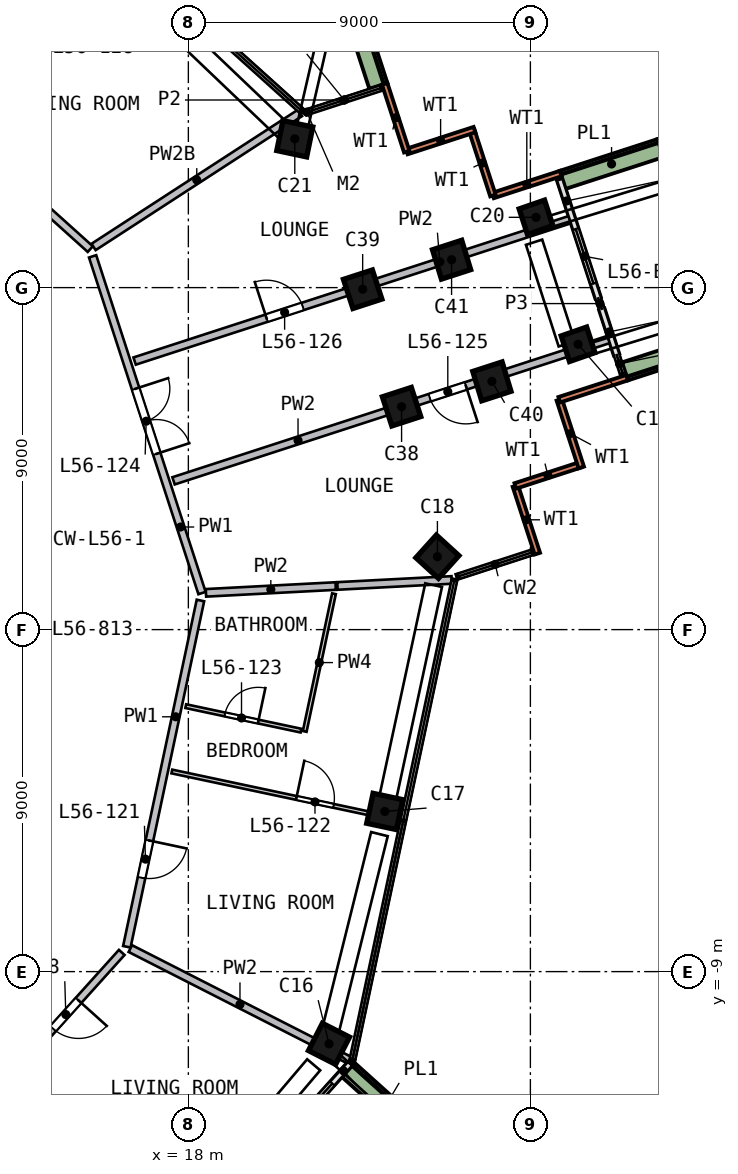
"""IFC4 building model, lengths in metres.
Left out: names, types, materials, properties, quantities, classifications, styles, units other than length and angle.
Written with IfcOpenShell. Run it as: python <this file> out.ifc"""

import sys

from ifc_helpers import new_model, si_unit, direction, frame, frame_2d, origin, origin_2d, place, context, subcontext, project, spatial, rectangle, extrude, element, fill, save


model = new_model("IFC4")
c1 = context("Model", 3, precision=1e-05, world=origin(), true_north=direction((0.0, 1.0)))
c2 = subcontext(c1, "Body", "Model", "MODEL_VIEW")
j1 = project(units=[si_unit("LENGTHUNIT", "METRE"), si_unit("PLANEANGLEUNIT", "RADIAN")], contexts=[c1])
p1 = place(None, origin())
s1 = spatial("IfcSite", under=j1, at=p1, CompositionType="ELEMENT")
p2 = place(p1, origin())
s2 = spatial("IfcBuilding", under=s1, at=p2, CompositionType="ELEMENT")
p3 = place(p2, frame((0.0, 0.0, 230.5)))
s3 = spatial("IfcBuildingStorey", under=s2, at=p3, CompositionType="ELEMENT", Elevation=230.5)
p4 = place(p3, frame((21.639, -11.025, 0.0), z_axis=(0.051543375, 0.103314818, 0.993312302), x_axis=(-0.450968307, -0.885041164, 0.11545442)))
e1 = element("IfcColumn", 1, at=p4, inside=s3, PredefinedType="COLUMN", context=c2, shape_type="SweptSolid", body=[
    extrude(rectangle(XDim=0.8, YDim=0.8, at=origin_2d()), origin(), (0.0, 0.0, 1.0), 3.211),
])
p5 = place(p3, frame((23.141, -4.919, 0.0), z_axis=(0.022434279, 0.110270183, 0.993648424), x_axis=(0.206353156, 0.971985836, -0.112525153)))
e2 = element("IfcColumn", 2, at=p5, inside=s3, PredefinedType="COLUMN", context=c2, shape_type="SweptSolid", body=[
    extrude(rectangle(XDim=0.8, YDim=0.8, at=origin_2d()), origin(), (0.0, 0.0, 1.0), 3.21),
])
p6 = place(p3, frame((24.565, 1.778, 0.0), z_axis=(-0.009425041, 0.116672885, 0.993125675), x_axis=(-0.672082244, -0.736131103, 0.080102789)))
e3 = element("IfcColumn", 3, at=p6, inside=s3, PredefinedType="COLUMN", context=c2, shape_type="SweptSolid", body=[
    extrude(rectangle(XDim=0.8, YDim=0.8, at=origin_2d()), origin(), (0.0, 0.0, 1.0), 3.212),
])
p7 = place(p3, frame((28.13, 7.29, 0.0), z_axis=(0.102010703, 0.178631077, 0.97861369), x_axis=(-0.326142329, 0.935378422, -0.136742054)))
e4 = element("IfcColumn", 4, at=p7, inside=s3, PredefinedType="COLUMN", context=c2, shape_type="SweptSolid", body=[
    extrude(rectangle(XDim=0.7, YDim=0.7, at=origin_2d()), origin(), (0.0, 0.0, 1.0), 3.26),
])
p8 = place(p3, frame((27.042, 10.637, 0.0), z_axis=(0.086490317, 0.173806496, 0.980974376), x_axis=(-0.324347801, 0.935930959, -0.1372288)))
e5 = element("IfcColumn", 5, at=p8, inside=s3, PredefinedType="COLUMN", context=c2, shape_type="SweptSolid", body=[
    extrude(rectangle(XDim=0.7, YDim=0.7, at=origin_2d()), origin(), (0.0, 0.0, 1.0), 3.252),
])
p9 = place(p3, frame((20.875, 12.797, 0.0), z_axis=(-0.061723248, 0.098741994, 0.993196989), x_axis=(0.976425462, -0.200246615, 0.08058915)))
e6 = element("IfcColumn", 6, at=p9, inside=s3, PredefinedType="COLUMN", context=c2, shape_type="SweptSolid", body=[
    extrude(rectangle(XDim=0.8, YDim=0.8, at=origin_2d()), origin(), (0.0, 0.0, 1.0), 3.212),
])
for number, where, z_axis, x_axis in (
    (7, (23.645, 5.731, 0.0), (-0.028, 0.112, 0.993), (0.951, 0.308, -0.008)),
    (8, (22.638, 8.828, 0.0), (-0.043, 0.107, 0.993), (0.951, 0.31, 0.008)),
):
    element("IfcColumn", number, at=place(p3, frame(where, z_axis=z_axis, x_axis=x_axis)), inside=s3, PredefinedType="COLUMN", context=c2, shape_type="SweptSolid", body=[
        extrude(rectangle(XDim=0.8, YDim=0.8, at=origin_2d()), origin(), (0.0, 0.0, 1.0), 3.211),
    ])
p10 = place(p3, frame((25.856, 6.326, 0.0), z_axis=(0.106725433, 0.168225683, 0.979953979), x_axis=(0.945902743, 0.286533668, -0.152205313)))
e9 = element("IfcColumn", 9, at=p10, inside=s3, PredefinedType="COLUMN", context=c2, shape_type="SweptSolid", body=[
    extrude(rectangle(XDim=0.8, YDim=0.8, at=origin_2d()), origin(), (0.0, 0.0, 1.0), 3.255),
])
p11 = place(p3, frame((24.814, 9.535, 0.0), z_axis=(0.09193902, 0.163580792, 0.9822365), x_axis=(0.947471522, 0.289093697, -0.136830366)))
e10 = element("IfcColumn", 10, at=p11, inside=s3, PredefinedType="COLUMN", context=c2, shape_type="SweptSolid", body=[
    extrude(rectangle(XDim=0.8, YDim=0.8, at=origin_2d()), origin(), (0.0, 0.0, 1.0), 3.248),
])
p12 = place(p3, frame((27.184, 1.998, 0.0), z_axis=(0.0, 0.0, 1.0), x_axis=(-0.308991853, 0.951064685, 0.0)))
e11 = element("IfcWall", 11, at=p12, inside=s3, PredefinedType="SOLIDWALL", context=c2, shape_type="SweptSolid", body=[
    extrude(rectangle(XDim=1.875, YDim=0.15, at=frame_2d((0.938, 0.0))), origin(), (0.0, 0.0, 1.0), 3.19),
])
p13 = place(p3, frame((26.604, 3.781, 0.0), z_axis=(0.0, 0.0, 1.0), x_axis=(0.951030082, 0.309098339, 0.0)))
e12 = element("IfcWall", 12, at=p13, inside=s3, PredefinedType="SOLIDWALL", context=c2, shape_type="SweptSolid", body=[
    extrude(rectangle(XDim=1.8, YDim=0.15, at=frame_2d((0.9, 0.0))), origin(), (0.0, 0.0, 1.0), 3.19),
])
p14 = place(p3, frame((28.34, 4.266, 0.0), z_axis=(0.0, 0.0, 1.0), x_axis=(-0.308953592, 0.951077114, 0.0)))
e13 = element("IfcWall", 13, at=p14, inside=s3, PredefinedType="SOLIDWALL", context=c2, shape_type="SweptSolid", body=[
    extrude(rectangle(XDim=1.875, YDim=0.15, at=frame_2d((0.938, 0.0))), origin(), (0.0, 0.0, 1.0), 3.19),
])
for number, where, z_axis, x_axis in (
    (14, (27.76, 6.05, 0.0), (0.0, 0.0, 1.0), (0.951, 0.309, 0.0)),
    (15, (27.797, 12.002, 0.0), (0.0, 0.0, 1.0), (-0.951, -0.309, 0.0)),
):
    element("IfcWall", number, at=place(p3, frame(where, z_axis=z_axis, x_axis=x_axis)), inside=s3, PredefinedType="SOLIDWALL", context=c2, shape_type="SweptSolid", body=[
        extrude(rectangle(XDim=1.875, YDim=0.15, at=frame_2d((0.938, 0.0))), origin(), (0.0, 0.0, 1.0), 3.19),
    ])
p15 = place(p3, frame((26.014, 11.423, 0.0), z_axis=(0.0, 0.0, 1.0), x_axis=(-0.308975661, 0.951069945, 0.0)))
e16 = element("IfcWall", 16, at=p15, inside=s3, PredefinedType="SOLIDWALL", context=c2, shape_type="SweptSolid", body=[
    extrude(rectangle(XDim=1.8, YDim=0.15, at=frame_2d((0.9, 0.0))), origin(), (0.0, 0.0, 1.0), 3.19),
])
for number, where, z_axis, x_axis in (
    (17, (25.529, 13.158, 0.0), (0.0, 0.0, 1.0), (-0.951, -0.309, 0.0)),
    (18, (23.746, 12.579, 0.0), (0.0, 0.0, 1.0), (-0.309, 0.951, 0.0)),
):
    element("IfcWall", number, at=place(p3, frame(where, z_axis=z_axis, x_axis=x_axis)), inside=s3, PredefinedType="SOLIDWALL", context=c2, shape_type="SweptSolid", body=[
        extrude(rectangle(XDim=1.875, YDim=0.15, at=frame_2d((0.938, 0.0))), origin(), (0.0, 0.0, 1.0), 3.19),
    ])
p16 = place(p3, frame((19.909, -14.03, 0.0), z_axis=(0.0, 0.0, 1.0), x_axis=(0.669103303, 0.743169409, 0.0)))
e19 = element("IfcWall", 19, at=p16, inside=s3, PredefinedType="SOLIDWALL", context=c2, shape_type="SweptSolid", body=[
    extrude(rectangle(XDim=3.504, YDim=0.15, at=frame_2d((1.752, 0.0))), origin(), (0.0, 0.0, 1.0), 2.525),
])
p17 = place(p16, frame((0.4, 0.0, 0.0)))
e20 = element("IfcOpeningElement", 20, at=p17, cuts=e19, PredefinedType="OPENING", context=c2, shape_type="SweptSolid", body=[
    extrude(rectangle(XDim=2.4, YDim=2.4, at=frame_2d((1.2, 1.2))), frame((0.0, 0.085, 0.0), z_axis=(0.0, -1.0, 0.0), x_axis=(1.0, 0.0, 0.0)), (0.0, 0.0, 1.0), 0.17),
])
p18 = place(p3, frame((28.781, 8.731, 0.0), z_axis=(0.0, 0.0, 1.0), x_axis=(-0.308984471, 0.951067083, 0.0)))
e21 = element("IfcWall", 21, at=p18, inside=s3, PredefinedType="SOLIDWALL", context=c2, shape_type="SweptSolid", body=[
    extrude(rectangle(XDim=3.26, YDim=0.15, at=frame_2d((1.63, 0.0))), origin(), (0.0, 0.0, 1.0), 2.525),
])
p19 = place(p18, frame((0.4, 0.0, 0.0)))
e22 = element("IfcOpeningElement", 22, at=p19, cuts=e21, PredefinedType="OPENING", context=c2, shape_type="SweptSolid", body=[
    extrude(rectangle(XDim=1.5, YDim=2.4, at=frame_2d((0.75, 1.2))), frame((0.0, 0.085, 0.0), z_axis=(0.0, -1.0, 0.0), x_axis=(1.0, 0.0, 0.0)), (0.0, 0.0, 1.0), 0.17),
])
p20 = place(p3, frame((29.267, 7.238, 0.0), z_axis=(0.0, 0.0, 1.0), x_axis=(-0.309077248, 0.951036937, 0.0)))
e23 = element("IfcWall", 23, at=p20, inside=s3, PredefinedType="SOLIDWALL", context=c2, shape_type="SweptSolid", body=[
    extrude(rectangle(XDim=1.251, YDim=0.15, at=frame_2d((0.625, 0.0))), origin(), (0.0, 0.0, 1.0), 2.525),
])
p21 = place(p3, frame((24.216, -13.394, 0.0), z_axis=(0.0, 0.0, 1.0), x_axis=(-0.743132215, 0.669144611, 0.0)))
e24 = element("IfcWall", 24, at=p21, inside=s3, PredefinedType="SOLIDWALL", context=c2, shape_type="SweptSolid", body=[
    extrude(rectangle(XDim=2.699, YDim=0.5, at=frame_2d((1.35, 0.0))), origin(), (0.0, 0.0, 1.0), 0.7),
])
p22 = place(p3, frame((29.49, 6.796, 0.0), z_axis=(0.0, 0.0, 1.0), x_axis=(0.951059864, 0.309006691, 0.0)))
e25 = element("IfcWall", 25, at=p22, inside=s3, PredefinedType="SOLIDWALL", context=c2, shape_type="SweptSolid", body=[
    extrude(rectangle(XDim=3.199, YDim=0.5, at=frame_2d((1.6, 0.0))), origin(), (0.0, 0.0, 1.0), 0.7),
])
p23 = place(p3, frame((32.218, 7.945, 0.0), z_axis=(0.0, 0.0, 1.0), x_axis=(-0.309032953, 0.951051331, 0.0)))
e26 = element("IfcWall", 26, at=p23, inside=s3, PredefinedType="SOLIDWALL", context=c2, shape_type="SweptSolid", body=[
    extrude(rectangle(XDim=5.3, YDim=0.5, at=frame_2d((2.65, 0.0))), origin(), (0.0, 0.0, 1.0), 0.7),
])
p24 = place(p3, frame((30.419, 12.67, 0.0), z_axis=(0.0, 0.0, 1.0), x_axis=(-0.951061984, -0.309000165, 0.0)))
e27 = element("IfcWall", 27, at=p24, inside=s3, PredefinedType="SOLIDWALL", context=c2, shape_type="SweptSolid", body=[
    extrude(rectangle(XDim=2.699, YDim=0.5, at=frame_2d((1.35, 0.0))), origin(), (0.0, 0.0, 1.0), 0.7),
])
p25 = place(p3, frame((23.0, 14.309, 0.0), z_axis=(0.0, 0.0, 1.0), x_axis=(-0.309030937, 0.951051986, 0.0)))
e28 = element("IfcWall", 28, at=p25, inside=s3, PredefinedType="SOLIDWALL", context=c2, shape_type="SweptSolid", body=[
    extrude(rectangle(XDim=2.303, YDim=0.5, at=frame_2d((1.151, 0.0))), origin(), (0.0, 0.0, 1.0), 0.7),
])
p26 = place(p3, frame((8.332, 16.394, 0.0), z_axis=(0.0, 0.0, 1.0), x_axis=(0.743143917, -0.669131616, 0.0)))
e29 = element("IfcWall", 29, at=p26, inside=s3, PredefinedType="SOLIDWALL", context=c2, shape_type="SweptSolid", body=[
    extrude(rectangle(XDim=9.536, YDim=0.2, at=frame_2d((4.768, 0.0))), origin(), (0.0, 0.0, 1.0), 3.19),
])
p27 = place(p26, frame((6.678, 0.0, 0.0)))
e30 = element("IfcOpeningElement", 30, at=p27, cuts=e29, PredefinedType="OPENING", context=c2, shape_type="SweptSolid", body=[
    extrude(rectangle(XDim=1.0, YDim=2.1, at=frame_2d((0.5, 1.05))), frame((0.0, 0.11, 0.0), z_axis=(0.0, -1.0, 0.0), x_axis=(1.0, 0.0, 0.0)), (0.0, 0.0, 1.0), 0.22),
])
p28 = place(p3, frame((16.247, -8.495, 0.0), z_axis=(0.0, 0.0, 1.0), x_axis=(-0.669127468, -0.743147652, 0.0)))
e31 = element("IfcWall", 31, at=p28, inside=s3, PredefinedType="SOLIDWALL", context=c2, shape_type="SweptSolid", body=[
    extrude(rectangle(XDim=9.116, YDim=0.2, at=frame_2d((4.558, 0.0))), origin(), (0.0, 0.0, 1.0), 3.19),
])
p29 = place(p28, frame((1.7, 0.0, 0.0)))
e32 = element("IfcOpeningElement", 32, at=p29, cuts=e31, PredefinedType="OPENING", context=c2, shape_type="SweptSolid", body=[
    extrude(rectangle(XDim=1.0, YDim=2.1, at=frame_2d((0.5, 1.05))), frame((0.0, 0.11, 0.0), z_axis=(0.0, -1.0, 0.0), x_axis=(1.0, 0.0, 0.0)), (0.0, 0.0, 1.0), 0.22),
])
p30 = place(p3, frame((15.481, 9.823, 0.0), z_axis=(0.0, 0.0, 1.0), x_axis=(0.309001933, -0.95106141, 0.0)))
e33 = element("IfcWall", 33, at=p30, inside=s3, PredefinedType="SOLIDWALL", context=c2, shape_type="SweptSolid", body=[
    extrude(rectangle(XDim=9.317, YDim=0.2, at=frame_2d((4.658, 0.0))), origin(), (0.0, 0.0, 1.0), 3.19),
])
p31 = place(p30, frame((3.663, 0.0, 0.0)))
e34 = element("IfcOpeningElement", 34, at=p31, cuts=e33, PredefinedType="OPENING", context=c2, shape_type="SweptSolid", body=[
    extrude(rectangle(XDim=1.8, YDim=2.1, at=frame_2d((0.9, 1.05))), frame((0.0, 0.11, 0.0), z_axis=(0.0, -1.0, 0.0), x_axis=(1.0, 0.0, 0.0)), (0.0, 0.0, 1.0), 0.22),
])
p32 = place(p3, frame((18.318, 0.767, 0.0), z_axis=(0.0, 0.0, 1.0), x_axis=(-0.207909214, -0.978148127, 0.0)))
e35 = element("IfcWall", 35, at=p32, inside=s3, PredefinedType="SOLIDWALL", context=c2, shape_type="SweptSolid", body=[
    extrude(rectangle(XDim=9.317, YDim=0.2, at=frame_2d((4.658, 0.0))), origin(), (0.0, 0.0, 1.0), 3.19),
])
p33 = place(p32, frame((6.458, 0.0, 0.0)))
e36 = element("IfcOpeningElement", 36, at=p33, cuts=e35, PredefinedType="OPENING", context=c2, shape_type="SweptSolid", body=[
    extrude(rectangle(XDim=1.0, YDim=2.1, at=frame_2d((0.5, 1.05))), frame((0.0, 0.11, 0.0), z_axis=(0.0, -1.0, 0.0), x_axis=(1.0, 0.0, 0.0)), (0.0, 0.0, 1.0), 0.22),
])
p34 = place(p3, frame((15.506, 10.07, 0.0), z_axis=(0.0, 0.0, 1.0), x_axis=(0.838671806, 0.544637128, 0.0)))
e37 = element("IfcWall", 37, at=p34, inside=s3, PredefinedType="SOLIDWALL", context=c2, shape_type="SweptSolid", body=[
    extrude(rectangle(XDim=6.476, YDim=0.2, at=frame_2d((3.238, 0.0))), origin(), (0.0, 0.0, 1.0), 2.69),
])
p35 = place(p3, frame((16.473, -8.394, 0.0), z_axis=(0.0, 0.0, 1.0), x_axis=(0.891008422, -0.453986774, 0.0)))
e38 = element("IfcWall", 38, at=p35, inside=s3, PredefinedType="SOLIDWALL", context=c2, shape_type="SweptSolid", body=[
    extrude(rectangle(XDim=6.476, YDim=0.2, at=frame_2d((3.238, 0.0))), origin(), (0.0, 0.0, 1.0), 3.19),
])
p36 = place(p3, frame((21.877, 1.146, 0.0), z_axis=(0.0, 0.0, 1.0), x_axis=(-0.998628855, -0.05234892, 0.0)))
e39 = element("IfcWall", 39, at=p36, inside=s3, PredefinedType="SOLIDWALL", context=c2, shape_type="SweptSolid", body=[
    extrude(rectangle(XDim=3.418, YDim=0.2, at=frame_2d((1.709, 0.0))), origin(), (0.0, 0.0, 1.0), 3.19),
])
p37 = place(p3, frame((16.586, 7.067, 0.0), z_axis=(0.0, 0.0, 1.0), x_axis=(0.951053293, 0.309026913, 0.0)))
e40 = element("IfcWall", 40, at=p37, inside=s3, PredefinedType="SOLIDWALL", context=c2, shape_type="SweptSolid", body=[
    extrude(rectangle(XDim=12.038, YDim=0.2, at=frame_2d((6.019, 0.0))), origin(), (0.0, 0.0, 1.0), 3.19),
])
p38 = place(p37, frame((3.65, 0.0, 0.0)))
e41 = element("IfcOpeningElement", 41, at=p38, cuts=e40, PredefinedType="OPENING", context=c2, shape_type="SweptSolid", body=[
    extrude(rectangle(XDim=1.0, YDim=2.1, at=frame_2d((0.5, 1.05))), frame((0.0, 0.11, 0.0), z_axis=(0.0, -1.0, 0.0), x_axis=(1.0, 0.0, 0.0)), (0.0, 0.0, 1.0), 0.22),
])
p39 = place(p3, frame((29.059, 7.635, 0.0), z_axis=(0.0, 0.0, 1.0), x_axis=(-0.951059254, -0.309008568, 0.0)))
e42 = element("IfcWall", 42, at=p39, inside=s3, PredefinedType="SOLIDWALL", context=c2, shape_type="SweptSolid", body=[
    extrude(rectangle(XDim=12.038, YDim=0.2, at=frame_2d((6.019, 0.0))), origin(), (0.0, 0.0, 1.0), 3.19),
])
p40 = place(p39, frame((3.95, 0.0, 0.0)))
e43 = element("IfcOpeningElement", 43, at=p40, cuts=e42, PredefinedType="OPENING", context=c2, shape_type="SweptSolid", body=[
    extrude(rectangle(XDim=1.0, YDim=2.1, at=frame_2d((0.5, 1.05))), frame((0.0, 0.11, 0.0), z_axis=(0.0, -1.0, 0.0), x_axis=(1.0, 0.0, 0.0)), (0.0, 0.0, 1.0), 0.22),
])
p41 = place(p3, frame((24.93, 1.306, 0.0), z_axis=(0.0, 0.0, 1.0), x_axis=(-0.998631902, -0.05229076, 0.0)))
e44 = element("IfcWall", 44, at=p41, inside=s3, PredefinedType="SOLIDWALL", context=c2, shape_type="SweptSolid", body=[
    extrude(rectangle(XDim=3.011, YDim=0.2, at=frame_2d((1.506, 0.0))), origin(), (0.0, 0.0, 1.0), 3.19),
])
p42 = place(p3, frame((12.017, 13.346, 0.0), z_axis=(0.0, 0.0, 1.0), x_axis=(0.669118247, 0.743155953, 0.0)))
e45 = element("IfcWall", 45, at=p42, inside=s3, PredefinedType="PARTITIONING", context=c2, shape_type="SweptSolid", body=[
    extrude(rectangle(XDim=6.15, YDim=0.1, at=frame_2d((3.075, 0.0))), origin(), (0.0, 0.0, 1.0), 3.19),
])
p43 = place(p42, frame((3.35, 0.0, 0.0)))
e46 = element("IfcOpeningElement", 46, at=p43, cuts=e45, PredefinedType="OPENING", context=c2, shape_type="SweptSolid", body=[
    extrude(rectangle(XDim=1.0, YDim=2.1, at=frame_2d((0.5, 1.05))), frame((0.0, 0.06, 0.0), z_axis=(0.0, -1.0, 0.0), x_axis=(1.0, 0.0, 0.0)), (0.0, 0.0, 1.0), 0.12),
])
p44 = place(p3, frame((17.916, -16.132, 0.0), z_axis=(0.0, 0.0, 1.0), x_axis=(-0.743155953, 0.669118247, 0.0)))
e47 = element("IfcWall", 47, at=p44, inside=s3, PredefinedType="PARTITIONING", context=c2, shape_type="SweptSolid", body=[
    extrude(rectangle(XDim=6.15, YDim=0.1, at=frame_2d((3.075, 0.0))), origin(), (0.0, 0.0, 1.0), 3.19),
])
p45 = place(p44, frame((1.8, 0.0, 0.0)))
e48 = element("IfcOpeningElement", 48, at=p45, cuts=e47, PredefinedType="OPENING", context=c2, shape_type="SweptSolid", body=[
    extrude(rectangle(XDim=1.0, YDim=2.1, at=frame_2d((0.5, 1.05))), frame((0.0, 0.06, 0.0), z_axis=(0.0, -1.0, 0.0), x_axis=(1.0, 0.0, 0.0)), (0.0, 0.0, 1.0), 0.12),
])
p46 = place(p3, frame((17.931, -2.014, 0.0), z_axis=(0.0, 0.0, 1.0), x_axis=(0.97814684, -0.20791527, 0.0)))
e49 = element("IfcWall", 49, at=p46, inside=s3, PredefinedType="PARTITIONING", context=c2, shape_type="SweptSolid", body=[
    extrude(rectangle(XDim=3.1, YDim=0.1, at=frame_2d((1.55, 0.0))), origin(), (0.0, 0.0, 1.0), 3.19),
])
p47 = place(p46, frame((1.05, 0.0, 0.0)))
e50 = element("IfcOpeningElement", 50, at=p47, cuts=e49, PredefinedType="OPENING", context=c2, shape_type="SweptSolid", body=[
    extrude(rectangle(XDim=0.9, YDim=2.1, at=frame_2d((0.45, 1.05))), frame((0.0, 0.06, 0.0), z_axis=(0.0, -1.0, 0.0), x_axis=(1.0, 0.0, 0.0)), (0.0, 0.0, 1.0), 0.12),
])
p48 = place(p3, frame((17.566, -3.734, 0.0), z_axis=(0.0, 0.0, 1.0), x_axis=(0.978142706, -0.20793472, 0.0)))
e51 = element("IfcWall", 51, at=p48, inside=s3, PredefinedType="PARTITIONING", context=c2, shape_type="SweptSolid", body=[
    extrude(rectangle(XDim=6.15, YDim=0.1, at=frame_2d((3.075, 0.0))), origin(), (0.0, 0.0, 1.0), 3.19),
])
p49 = place(p48, frame((3.35, 0.0, 0.0)))
e52 = element("IfcOpeningElement", 52, at=p49, cuts=e51, PredefinedType="OPENING", context=c2, shape_type="SweptSolid", body=[
    extrude(rectangle(XDim=1.0, YDim=2.1, at=frame_2d((0.5, 1.05))), frame((0.0, 0.06, 0.0), z_axis=(0.0, -1.0, 0.0), x_axis=(1.0, 0.0, 0.0)), (0.0, 0.0, 1.0), 0.12),
])
p50 = place(p3, frame((21.062, -2.679, 0.0), z_axis=(0.0, 0.0, 1.0), x_axis=(0.207890288, 0.97815215, 0.0)))
e53 = element("IfcWall", 53, at=p50, inside=s3, PredefinedType="PARTITIONING", context=c2, shape_type="SweptSolid", body=[
    extrude(rectangle(XDim=3.704, YDim=0.1, at=frame_2d((1.852, 0.0))), origin(), (0.0, 0.0, 1.0), 3.19),
])
p51 = place(p17, origin())
e54 = element("IfcDoor", 54, at=p51, inside=s3, OperationType="SLIDING_TO_RIGHT", PredefinedType="DOOR", context=c2, shape_type="SweptSolid", body=[
    extrude(rectangle(XDim=2.4, YDim=2.4, at=frame_2d((1.2, 1.2))), frame((0.0, 0.025, 0.0), z_axis=(0.0, -1.0, 0.0), x_axis=(1.0, 0.0, 0.0)), (0.0, 0.0, 1.0), 0.05),
])
fill(e20, e54)
p52 = place(p19, origin())
e55 = element("IfcDoor", 55, at=p52, inside=s3, OperationType="SLIDING_TO_RIGHT", PredefinedType="DOOR", context=c2, shape_type="SweptSolid", body=[
    extrude(rectangle(XDim=1.5, YDim=2.4, at=frame_2d((0.75, 1.2))), frame((0.0, 0.025, 0.0), z_axis=(0.0, -1.0, 0.0), x_axis=(1.0, 0.0, 0.0)), (0.0, 0.0, 1.0), 0.05),
])
fill(e22, e55)
p53 = place(p29, origin())
e56 = element("IfcDoor", 56, at=p53, inside=s3, OperationType="SINGLE_SWING_LEFT", PredefinedType="DOOR", context=c2, shape_type="SweptSolid", body=[
    extrude(rectangle(XDim=1.0, YDim=2.1, at=frame_2d((0.5, 1.05))), frame((0.0, 0.025, 0.0), z_axis=(0.0, -1.0, 0.0), x_axis=(1.0, 0.0, 0.0)), (0.0, 0.0, 1.0), 0.05),
])
fill(e32, e56)
p54 = place(p33, origin())
e57 = element("IfcDoor", 57, at=p54, inside=s3, OperationType="SINGLE_SWING_LEFT", PredefinedType="DOOR", context=c2, shape_type="SweptSolid", body=[
    extrude(rectangle(XDim=1.0, YDim=2.1, at=frame_2d((0.5, 1.05))), frame((0.0, 0.025, 0.0), z_axis=(0.0, -1.0, 0.0), x_axis=(1.0, 0.0, 0.0)), (0.0, 0.0, 1.0), 0.05),
])
fill(e36, e57)
p55 = place(p49, origin())
e58 = element("IfcDoor", 58, at=p55, inside=s3, OperationType="SINGLE_SWING_LEFT", PredefinedType="DOOR", context=c2, shape_type="SweptSolid", body=[
    extrude(rectangle(XDim=1.0, YDim=2.1, at=frame_2d((0.5, 1.05))), frame((0.0, 0.025, 0.0), z_axis=(0.0, -1.0, 0.0), x_axis=(1.0, 0.0, 0.0)), (0.0, 0.0, 1.0), 0.05),
])
fill(e52, e58)
p56 = place(p47, origin())
e59 = element("IfcDoor", 59, at=p56, inside=s3, OperationType="SINGLE_SWING_RIGHT", PredefinedType="DOOR", context=c2, shape_type="SweptSolid", body=[
    extrude(rectangle(XDim=0.9, YDim=2.1, at=frame_2d((0.45, 1.05))), frame((0.0, 0.025, 0.0), z_axis=(0.0, -1.0, 0.0), x_axis=(1.0, 0.0, 0.0)), (0.0, 0.0, 1.0), 0.05),
])
fill(e50, e59)
p57 = place(p31, origin())
e60 = element("IfcDoor", 60, at=p57, inside=s3, OperationType="DOUBLE_DOOR_SINGLE_SWING", PredefinedType="DOOR", context=c2, shape_type="SweptSolid", body=[
    extrude(rectangle(XDim=1.8, YDim=2.1, at=frame_2d((0.9, 1.05))), frame((0.0, 0.025, 0.0), z_axis=(0.0, -1.0, 0.0), x_axis=(1.0, 0.0, 0.0)), (0.0, 0.0, 1.0), 0.05),
])
fill(e34, e60)
p58 = place(p40, origin())
e61 = element("IfcDoor", 61, at=p58, inside=s3, OperationType="SINGLE_SWING_LEFT", PredefinedType="DOOR", context=c2, shape_type="SweptSolid", body=[
    extrude(rectangle(XDim=1.0, YDim=2.1, at=frame_2d((0.5, 1.05))), frame((0.0, 0.025, 0.0), z_axis=(0.0, -1.0, 0.0), x_axis=(1.0, 0.0, 0.0)), (0.0, 0.0, 1.0), 0.05),
])
fill(e43, e61)
p59 = place(p38, origin())
e62 = element("IfcDoor", 62, at=p59, inside=s3, OperationType="SINGLE_SWING_LEFT", PredefinedType="DOOR", context=c2, shape_type="SweptSolid", body=[
    extrude(rectangle(XDim=1.0, YDim=2.1, at=frame_2d((0.5, 1.05))), frame((0.0, 0.025, 0.0), z_axis=(0.0, -1.0, 0.0), x_axis=(1.0, 0.0, 0.0)), (0.0, 0.0, 1.0), 0.05),
])
fill(e41, e62)
save(model, sys.argv[1])
